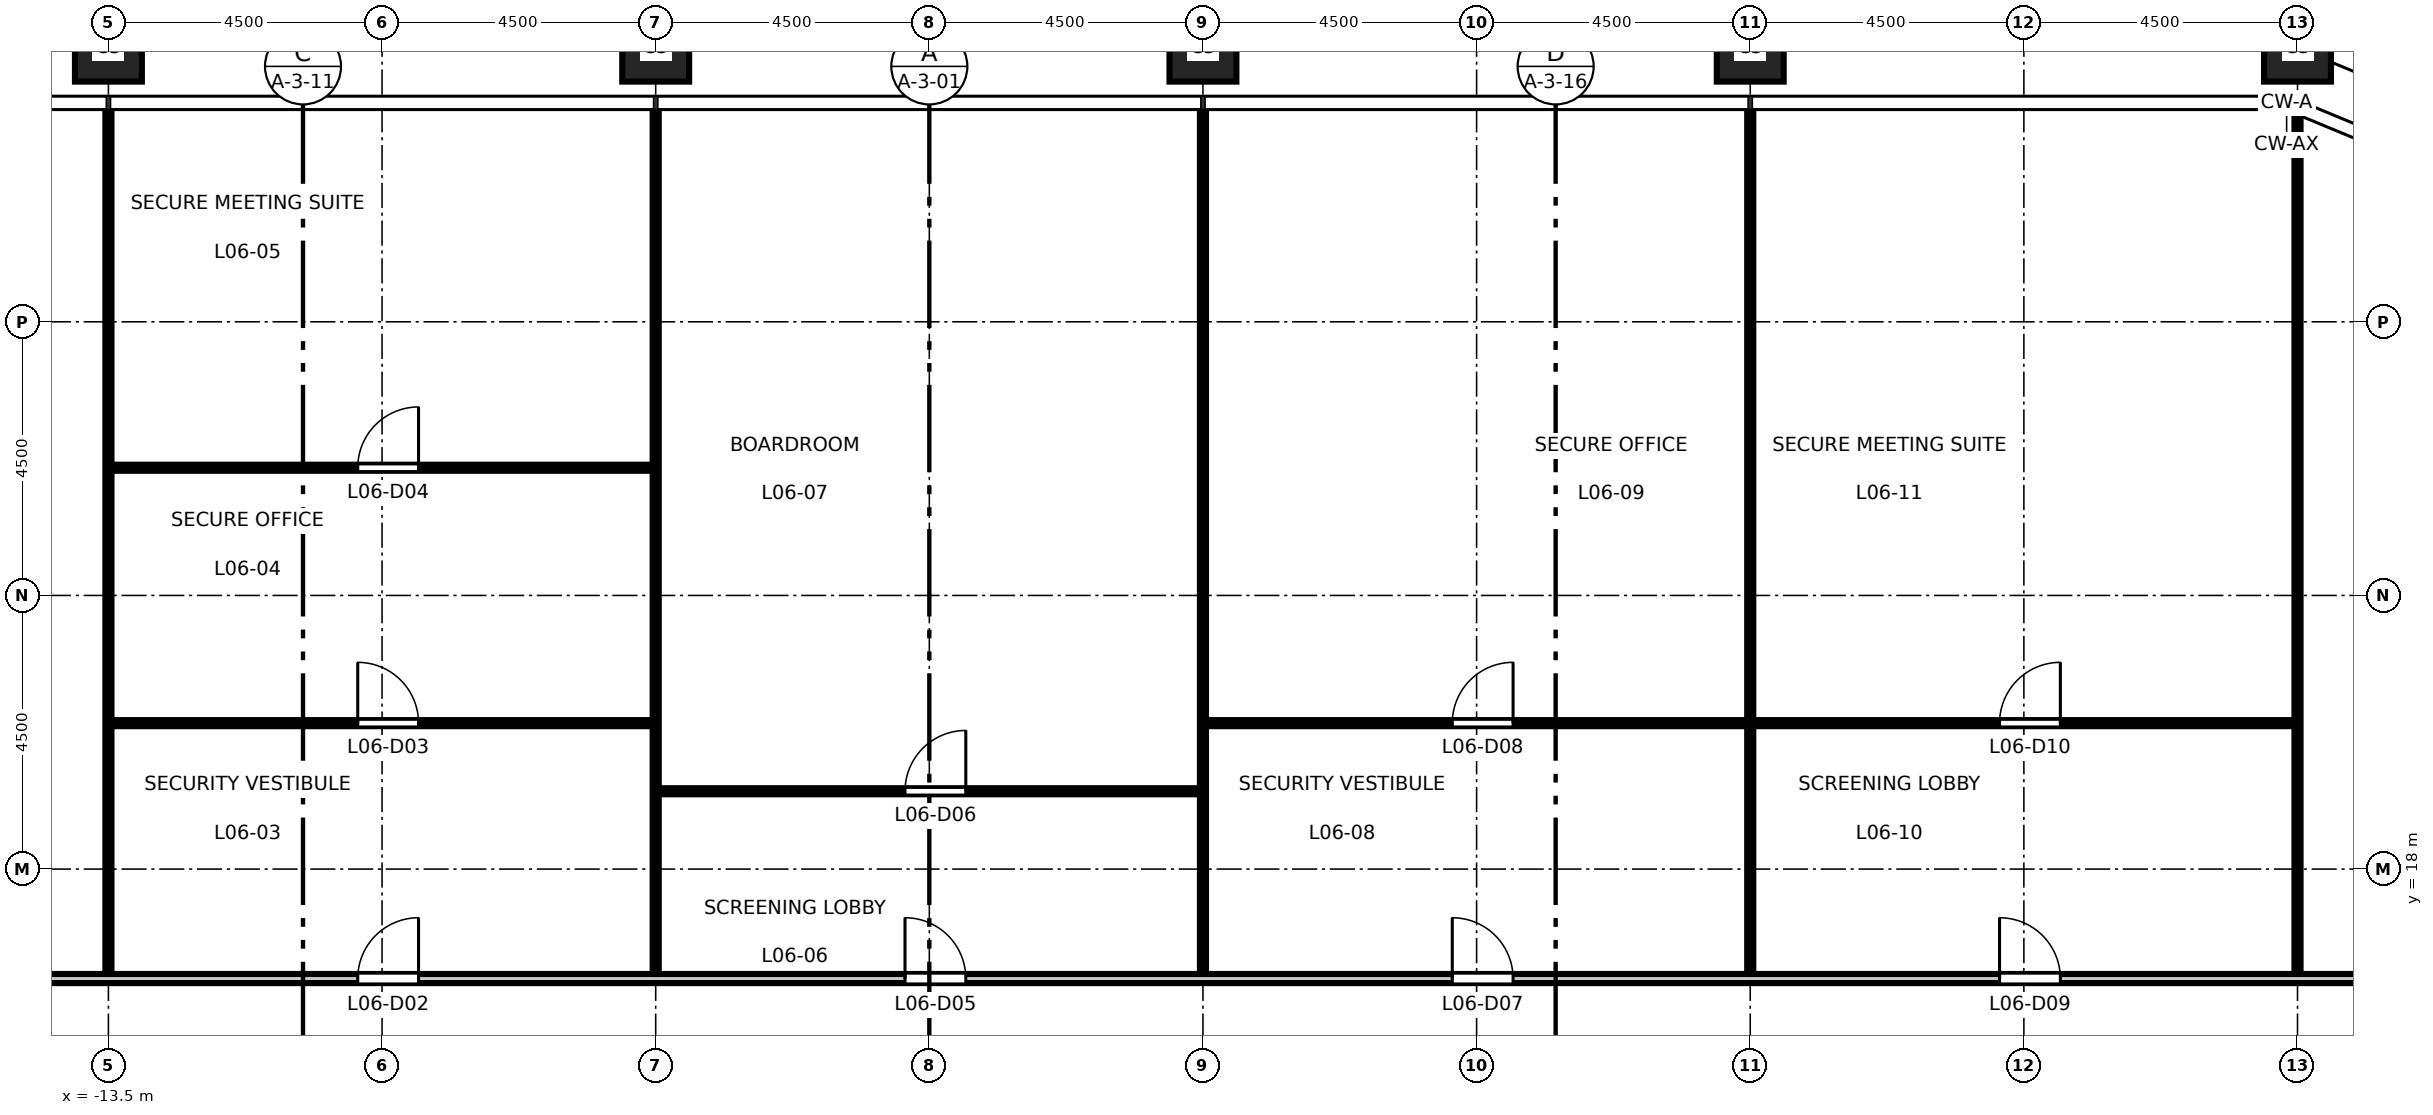
"""IFC4 building model, lengths in metres.
Left out: names, types, materials, properties, quantities, classifications, styles, units other than length and angle.
Written with IfcOpenShell. Run it as: python <this file> out.ifc"""

import sys

from ifc_helpers import new_model, si_unit, direction, frame, frame_2d, origin, origin_2d, place, context, subcontext, project, spatial, rectangle, hollow_rectangle, extrude, element, fill, save


model = new_model("IFC4")
c1 = context("Model", 3, precision=1e-05, world=origin(), true_north=direction((0.0, 1.0)))
c2 = subcontext(c1, "Body", "Model", "MODEL_VIEW")
j1 = project(units=[si_unit("LENGTHUNIT", "METRE"), si_unit("PLANEANGLEUNIT", "RADIAN")], contexts=[c1])
p1 = place(None, origin())
s1 = spatial("IfcSite", under=j1, at=p1, CompositionType="ELEMENT")
p2 = place(p1, origin())
s2 = spatial("IfcBuilding", under=s1, at=p2, CompositionType="ELEMENT")
p3 = place(p2, frame((0.0, 0.0, 31.2)))
s3 = spatial("IfcBuildingStorey", under=s2, at=p3, CompositionType="ELEMENT", Elevation=31.2)
for number, where, z_axis, x_axis in (
    (1, (22.5, 31.5, 0.0), (0.0, 0.0, 1.0), (1.0, 0.0, 0.0)),
    (2, (13.5, 31.5, 0.0), (0.0, 0.0, 1.0), (1.0, 0.0, 0.0)),
    (3, (4.5, 31.5, 0.0), (0.0, 0.0, 1.0), (1.0, 0.0, 0.0)),
    (4, (-4.5, 31.5, 0.0), (0.0, 0.0, 1.0), (1.0, 0.0, 0.0)),
    (5, (-13.5, 31.5, 0.0), (0.0, 0.0, 1.0), (1.0, 0.0, 0.0)),
):
    element("IfcColumn", number, at=place(p3, frame(where, z_axis=z_axis, x_axis=x_axis)), inside=s3, PredefinedType="COLUMN", context=c2, shape_type="SweptSolid", body=[
        extrude(hollow_rectangle(XDim=1.1, YDim=1.1, WallThickness=0.07, at=origin_2d()), origin(), (0.0, 0.0, 1.0), 4.5),
    ])
p4 = place(p3, frame((-24.525, 16.2, 0.0), z_axis=(0.0, 0.0, 1.0), x_axis=(1.0, 0.0, 0.0)))
e6 = element("IfcWall", 6, at=p4, inside=s3, PredefinedType="PARTITIONING", context=c2, shape_type="SweptSolid", body=[
    extrude(rectangle(XDim=49.05, YDim=0.15, at=frame_2d((24.525, 0.0))), origin(), (0.0, 0.0, 1.0), 4.35),
])
p5 = place(p4, frame((6.125, 0.0, 0.0)))
e7 = element("IfcOpeningElement", 7, at=p5, cuts=e6, PredefinedType="OPENING", context=c2, shape_type="SweptSolid", body=[
    extrude(rectangle(XDim=1.0, YDim=2.1, at=frame_2d((0.5, 1.05))), frame((0.0, 0.085, 0.0), z_axis=(0.0, -1.0, 0.0), x_axis=(1.0, 0.0, 0.0)), (0.0, 0.0, 1.0), 0.17),
])
p6 = place(p4, frame((15.125, 0.0, 0.0)))
e8 = element("IfcOpeningElement", 8, at=p6, cuts=e6, PredefinedType="OPENING", context=c2, shape_type="SweptSolid", body=[
    extrude(rectangle(XDim=1.0, YDim=2.1, at=frame_2d((0.5, 1.05))), frame((0.0, 0.085, 0.0), z_axis=(0.0, -1.0, 0.0), x_axis=(1.0, 0.0, 0.0)), (0.0, 0.0, 1.0), 0.17),
])
p7 = place(p4, frame((24.125, 0.0, 0.0)))
e9 = element("IfcOpeningElement", 9, at=p7, cuts=e6, PredefinedType="OPENING", context=c2, shape_type="SweptSolid", body=[
    extrude(rectangle(XDim=1.0, YDim=2.1, at=frame_2d((0.5, 1.05))), frame((0.0, 0.085, 0.0), z_axis=(0.0, -1.0, 0.0), x_axis=(1.0, 0.0, 0.0)), (0.0, 0.0, 1.0), 0.17),
])
p8 = place(p4, frame((33.125, 0.0, 0.0)))
e10 = element("IfcOpeningElement", 10, at=p8, cuts=e6, PredefinedType="OPENING", context=c2, shape_type="SweptSolid", body=[
    extrude(rectangle(XDim=1.0, YDim=2.1, at=frame_2d((0.5, 1.05))), frame((0.0, 0.085, 0.0), z_axis=(0.0, -1.0, 0.0), x_axis=(1.0, 0.0, 0.0)), (0.0, 0.0, 1.0), 0.17),
])
p9 = place(p4, frame((42.125, 0.0, 0.0)))
e11 = element("IfcOpeningElement", 11, at=p9, cuts=e6, PredefinedType="OPENING", context=c2, shape_type="SweptSolid", body=[
    extrude(rectangle(XDim=1.0, YDim=2.1, at=frame_2d((0.5, 1.05))), frame((0.0, 0.085, 0.0), z_axis=(0.0, -1.0, 0.0), x_axis=(1.0, 0.0, 0.0)), (0.0, 0.0, 1.0), 0.17),
])
p10 = place(p3, frame((-4.45, 19.28, 0.0), z_axis=(0.0, 0.0, 1.0), x_axis=(1.0, 0.0, 0.0)))
e12 = element("IfcWall", 12, at=p10, inside=s3, PredefinedType="PARTITIONING", context=c2, shape_type="SweptSolid", body=[
    extrude(rectangle(XDim=8.9, YDim=0.1, at=frame_2d((4.45, 0.0))), origin(), (0.0, 0.0, 1.0), 4.35),
])
p11 = place(p10, frame((4.05, 0.0, 0.0)))
e13 = element("IfcOpeningElement", 13, at=p11, cuts=e12, PredefinedType="OPENING", context=c2, shape_type="SweptSolid", body=[
    extrude(rectangle(XDim=1.0, YDim=2.1, at=frame_2d((0.5, 1.05))), frame((0.0, 0.06, 0.0), z_axis=(0.0, -1.0, 0.0), x_axis=(1.0, 0.0, 0.0)), (0.0, 0.0, 1.0), 0.12),
])
p12 = place(p3, frame((-13.45, 20.4, 0.0), z_axis=(0.0, 0.0, 1.0), x_axis=(1.0, 0.0, 0.0)))
e14 = element("IfcWall", 14, at=p12, inside=s3, PredefinedType="PARTITIONING", context=c2, shape_type="SweptSolid", body=[
    extrude(rectangle(XDim=8.9, YDim=0.1, at=frame_2d((4.45, 0.0))), origin(), (0.0, 0.0, 1.0), 4.35),
])
p13 = place(p12, frame((4.05, 0.0, 0.0)))
e15 = element("IfcOpeningElement", 15, at=p13, cuts=e14, PredefinedType="OPENING", context=c2, shape_type="SweptSolid", body=[
    extrude(rectangle(XDim=1.0, YDim=2.1, at=frame_2d((0.5, 1.05))), frame((0.0, 0.06, 0.0), z_axis=(0.0, -1.0, 0.0), x_axis=(1.0, 0.0, 0.0)), (0.0, 0.0, 1.0), 0.12),
])
p14 = place(p3, frame((4.55, 20.4, 0.0), z_axis=(0.0, 0.0, 1.0), x_axis=(1.0, 0.0, 0.0)))
e16 = element("IfcWall", 16, at=p14, inside=s3, PredefinedType="PARTITIONING", context=c2, shape_type="SweptSolid", body=[
    extrude(rectangle(XDim=17.9, YDim=0.1, at=frame_2d((8.95, 0.0))), origin(), (0.0, 0.0, 1.0), 4.35),
])
p15 = place(p14, frame((4.05, 0.0, 0.0)))
e17 = element("IfcOpeningElement", 17, at=p15, cuts=e16, PredefinedType="OPENING", context=c2, shape_type="SweptSolid", body=[
    extrude(rectangle(XDim=1.0, YDim=2.1, at=frame_2d((0.5, 1.05))), frame((0.0, 0.06, 0.0), z_axis=(0.0, -1.0, 0.0), x_axis=(1.0, 0.0, 0.0)), (0.0, 0.0, 1.0), 0.12),
])
p16 = place(p14, frame((13.05, 0.0, 0.0)))
e18 = element("IfcOpeningElement", 18, at=p16, cuts=e16, PredefinedType="OPENING", context=c2, shape_type="SweptSolid", body=[
    extrude(rectangle(XDim=1.0, YDim=2.1, at=frame_2d((0.5, 1.05))), frame((0.0, 0.06, 0.0), z_axis=(0.0, -1.0, 0.0), x_axis=(1.0, 0.0, 0.0)), (0.0, 0.0, 1.0), 0.12),
])
p17 = place(p3, frame((-13.45, 24.6, 0.0), z_axis=(0.0, 0.0, 1.0), x_axis=(1.0, 0.0, 0.0)))
e19 = element("IfcWall", 19, at=p17, inside=s3, PredefinedType="PARTITIONING", context=c2, shape_type="SweptSolid", body=[
    extrude(rectangle(XDim=8.9, YDim=0.1, at=frame_2d((4.45, 0.0))), origin(), (0.0, 0.0, 1.0), 4.35),
])
p18 = place(p17, frame((4.05, 0.0, 0.0)))
e20 = element("IfcOpeningElement", 20, at=p18, cuts=e19, PredefinedType="OPENING", context=c2, shape_type="SweptSolid", body=[
    extrude(rectangle(XDim=1.0, YDim=2.1, at=frame_2d((0.5, 1.05))), frame((0.0, 0.06, 0.0), z_axis=(0.0, -1.0, 0.0), x_axis=(1.0, 0.0, 0.0)), (0.0, 0.0, 1.0), 0.12),
])
for number, where, z_axis, x_axis in (
    (21, (-13.5, 16.275, 0.0), (0.0, 0.0, 1.0), (0.0, 1.0, 0.0)),
    (22, (-4.5, 16.275, 0.0), (0.0, 0.0, 1.0), (0.0, 1.0, 0.0)),
    (23, (4.5, 16.275, 0.0), (0.0, 0.0, 1.0), (0.0, 1.0, 0.0)),
):
    element("IfcWall", number, at=place(p3, frame(where, z_axis=z_axis, x_axis=x_axis)), inside=s3, PredefinedType="PARTITIONING", context=c2, shape_type="SweptSolid", body=[
        extrude(rectangle(XDim=14.235, YDim=0.1, at=frame_2d((7.118, 0.0))), origin(), (0.0, 0.0, 1.0), 3.35),
    ])
p19 = place(p3, frame((13.5, 16.275, 0.0), z_axis=(0.0, 0.0, 1.0), x_axis=(0.0, 1.0, 0.0)))
e24 = element("IfcWall", 24, at=p19, inside=s3, PredefinedType="PARTITIONING", context=c2, shape_type="SweptSolid", body=[
    extrude(rectangle(XDim=4.075, YDim=0.1, at=frame_2d((2.038, 0.0))), origin(), (0.0, 0.0, 1.0), 3.35),
])
p20 = place(p3, frame((13.5, 20.45, 0.0), z_axis=(0.0, 0.0, 1.0), x_axis=(0.0, 1.0, 0.0)))
e25 = element("IfcWall", 25, at=p20, inside=s3, PredefinedType="PARTITIONING", context=c2, shape_type="SweptSolid", body=[
    extrude(rectangle(XDim=10.06, YDim=0.1, at=frame_2d((5.03, 0.0))), origin(), (0.0, 0.0, 1.0), 3.35),
])
p21 = place(p3, frame((22.5, 16.275, 0.0), z_axis=(0.0, 0.0, 1.0), x_axis=(0.0, 1.0, 0.0)))
e26 = element("IfcWall", 26, at=p21, inside=s3, PredefinedType="PARTITIONING", context=c2, shape_type="SweptSolid", body=[
    extrude(rectangle(XDim=14.153, YDim=0.1, at=frame_2d((7.077, 0.0))), origin(), (0.0, 0.0, 1.0), 3.35),
])
p22 = place(p6, origin())
e27 = element("IfcDoor", 27, at=p22, inside=s3, OperationType="SINGLE_SWING_RIGHT", PredefinedType="DOOR", context=c2, shape_type="SweptSolid", body=[
    extrude(rectangle(XDim=1.0, YDim=2.1, at=frame_2d((0.5, 1.05))), frame((0.0, 0.025, 0.0), z_axis=(0.0, -1.0, 0.0), x_axis=(1.0, 0.0, 0.0)), (0.0, 0.0, 1.0), 0.05),
])
fill(e8, e27)
p23 = place(p13, origin())
e28 = element("IfcDoor", 28, at=p23, inside=s3, OperationType="SINGLE_SWING_LEFT", PredefinedType="DOOR", context=c2, shape_type="SweptSolid", body=[
    extrude(rectangle(XDim=1.0, YDim=2.1, at=frame_2d((0.5, 1.05))), frame((0.0, 0.025, 0.0), z_axis=(0.0, -1.0, 0.0), x_axis=(1.0, 0.0, 0.0)), (0.0, 0.0, 1.0), 0.05),
])
fill(e15, e28)
p24 = place(p18, origin())
e29 = element("IfcDoor", 29, at=p24, inside=s3, OperationType="SINGLE_SWING_RIGHT", PredefinedType="DOOR", context=c2, shape_type="SweptSolid", body=[
    extrude(rectangle(XDim=1.0, YDim=2.1, at=frame_2d((0.5, 1.05))), frame((0.0, 0.025, 0.0), z_axis=(0.0, -1.0, 0.0), x_axis=(1.0, 0.0, 0.0)), (0.0, 0.0, 1.0), 0.05),
])
fill(e20, e29)
p25 = place(p7, origin())
e30 = element("IfcDoor", 30, at=p25, inside=s3, OperationType="SINGLE_SWING_LEFT", PredefinedType="DOOR", context=c2, shape_type="SweptSolid", body=[
    extrude(rectangle(XDim=1.0, YDim=2.1, at=frame_2d((0.5, 1.05))), frame((0.0, 0.025, 0.0), z_axis=(0.0, -1.0, 0.0), x_axis=(1.0, 0.0, 0.0)), (0.0, 0.0, 1.0), 0.05),
])
fill(e9, e30)
p26 = place(p11, origin())
e31 = element("IfcDoor", 31, at=p26, inside=s3, OperationType="SINGLE_SWING_RIGHT", PredefinedType="DOOR", context=c2, shape_type="SweptSolid", body=[
    extrude(rectangle(XDim=1.0, YDim=2.1, at=frame_2d((0.5, 1.05))), frame((0.0, 0.025, 0.0), z_axis=(0.0, -1.0, 0.0), x_axis=(1.0, 0.0, 0.0)), (0.0, 0.0, 1.0), 0.05),
])
fill(e13, e31)
p27 = place(p8, origin())
e32 = element("IfcDoor", 32, at=p27, inside=s3, OperationType="SINGLE_SWING_LEFT", PredefinedType="DOOR", context=c2, shape_type="SweptSolid", body=[
    extrude(rectangle(XDim=1.0, YDim=2.1, at=frame_2d((0.5, 1.05))), frame((0.0, 0.025, 0.0), z_axis=(0.0, -1.0, 0.0), x_axis=(1.0, 0.0, 0.0)), (0.0, 0.0, 1.0), 0.05),
])
fill(e10, e32)
p28 = place(p15, origin())
e33 = element("IfcDoor", 33, at=p28, inside=s3, OperationType="SINGLE_SWING_RIGHT", PredefinedType="DOOR", context=c2, shape_type="SweptSolid", body=[
    extrude(rectangle(XDim=1.0, YDim=2.1, at=frame_2d((0.5, 1.05))), frame((0.0, 0.025, 0.0), z_axis=(0.0, -1.0, 0.0), x_axis=(1.0, 0.0, 0.0)), (0.0, 0.0, 1.0), 0.05),
])
fill(e17, e33)
p29 = place(p9, origin())
e34 = element("IfcDoor", 34, at=p29, inside=s3, OperationType="SINGLE_SWING_LEFT", PredefinedType="DOOR", context=c2, shape_type="SweptSolid", body=[
    extrude(rectangle(XDim=1.0, YDim=2.1, at=frame_2d((0.5, 1.05))), frame((0.0, 0.025, 0.0), z_axis=(0.0, -1.0, 0.0), x_axis=(1.0, 0.0, 0.0)), (0.0, 0.0, 1.0), 0.05),
])
fill(e11, e34)
p30 = place(p16, origin())
e35 = element("IfcDoor", 35, at=p30, inside=s3, OperationType="SINGLE_SWING_RIGHT", PredefinedType="DOOR", context=c2, shape_type="SweptSolid", body=[
    extrude(rectangle(XDim=1.0, YDim=2.1, at=frame_2d((0.5, 1.05))), frame((0.0, 0.025, 0.0), z_axis=(0.0, -1.0, 0.0), x_axis=(1.0, 0.0, 0.0)), (0.0, 0.0, 1.0), 0.05),
])
fill(e18, e35)
save(model, sys.argv[1])
